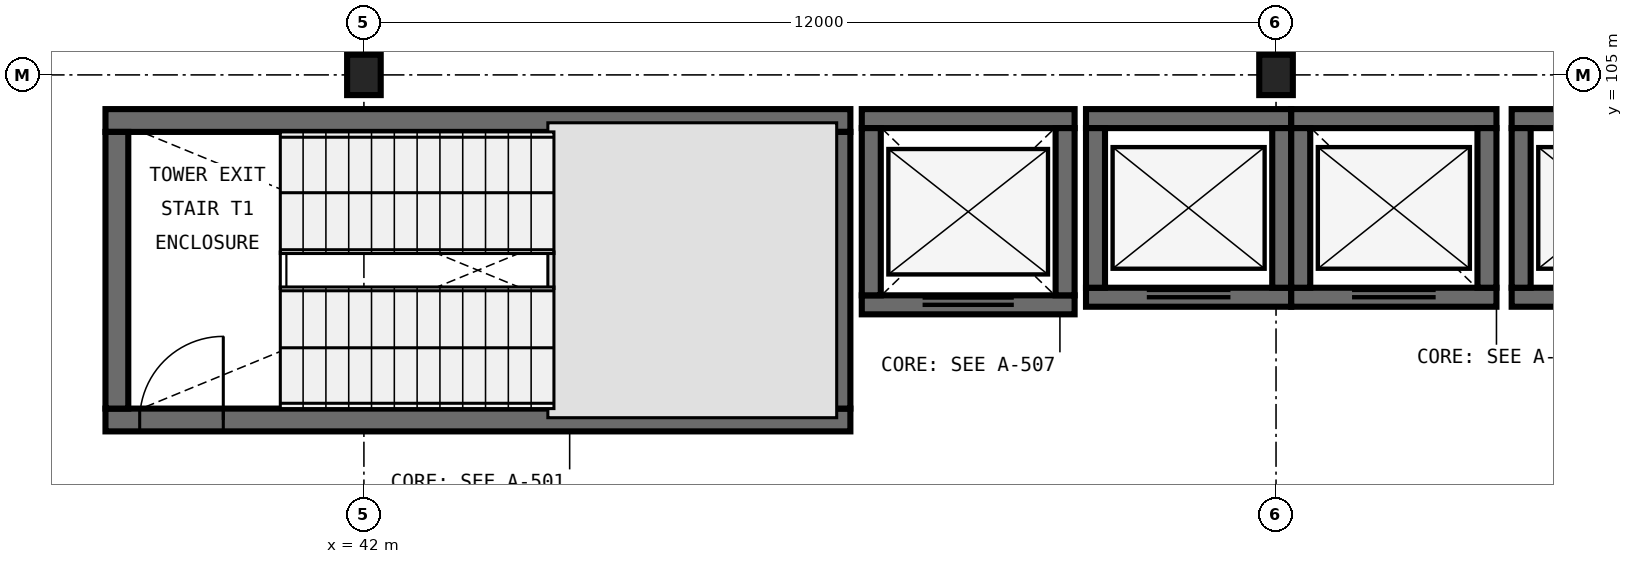
"""IFC4 building model, lengths in metres.
Left out: names, types, materials, properties, quantities, classifications, styles, units other than length and angle.
Written with IfcOpenShell. Run it as: python <this file> out.ifc"""

import sys

from ifc_helpers import new_model, si_unit, direction, frame, frame_2d, origin, origin_2d, place, context, subcontext, project, spatial, rectangle, i_section, extrude, element, fill, save


model = new_model("IFC4")
c1 = context("Model", 3, precision=1e-05, world=origin(), true_north=direction((0.0, 1.0)))
c2 = subcontext(c1, "Body", "Model", "MODEL_VIEW")
j1 = project(units=[si_unit("LENGTHUNIT", "METRE"), si_unit("PLANEANGLEUNIT", "RADIAN")], contexts=[c1])
p1 = place(None, origin())
s1 = spatial("IfcSite", under=j1, at=p1, CompositionType="ELEMENT")
p2 = place(p1, origin())
s2 = spatial("IfcBuilding", under=s1, at=p2, CompositionType="ELEMENT")
p3 = place(p2, frame((0.0, 0.0, 23.4)))
s3 = spatial("IfcBuildingStorey", under=s2, at=p3, CompositionType="ELEMENT", Elevation=23.4)
for number, where, z_axis, x_axis in (
    (1, (42.0, 105.0, 0.0), (0.0, 0.0, 1.0), (1.0, 0.0, 0.0)),
    (2, (54.0, 105.0, 0.0), (0.0, 0.0, 1.0), (1.0, 0.0, 0.0)),
):
    element("IfcColumn", number, at=place(p3, frame(where, z_axis=z_axis, x_axis=x_axis)), inside=s3, PredefinedType="COLUMN", context=c2, shape_type="SweptSolid", body=[
        extrude(i_section(OverallWidth=0.442, OverallDepth=0.531, WebThickness=0.066, FlangeThickness=0.106, FilletRadius=0.031, at=origin_2d()), origin(), (0.0, 0.0, 1.0), 4.2),
    ])
p4 = place(p3, frame((38.6, 100.46, 0.0), z_axis=(0.0, 0.0, 1.0), x_axis=(1.0, 0.0, 0.0)))
e3 = element("IfcWall", 3, at=p4, inside=s3, PredefinedType="SHEAR", context=c2, shape_type="SweptSolid", body=[
    extrude(rectangle(XDim=9.8, YDim=0.3, at=frame_2d((4.9, 0.0))), origin(), (0.0, 0.0, 1.0), 4.2),
])
p5 = place(p4, frame((0.45, 0.0, 0.0)))
e4 = element("IfcOpeningElement", 4, at=p5, cuts=e3, PredefinedType="OPENING", context=c2, shape_type="SweptSolid", body=[
    extrude(rectangle(XDim=1.1, YDim=2.2, at=frame_2d((0.55, 1.1))), frame((0.0, 0.165, 0.0), z_axis=(0.0, -1.0, 0.0), x_axis=(1.0, 0.0, 0.0)), (0.0, 0.0, 1.0), 0.33),
])
p6 = place(p3, frame((48.4, 104.4, 0.0), z_axis=(0.0, 0.0, 1.0), x_axis=(-1.0, 0.0, 0.0)))
e5 = element("IfcWall", 5, at=p6, inside=s3, PredefinedType="SHEAR", context=c2, shape_type="SweptSolid", body=[
    extrude(rectangle(XDim=9.8, YDim=0.3, at=frame_2d((4.9, 0.0))), origin(), (0.0, 0.0, 1.0), 4.2),
])
for number, where, z_axis, x_axis in (
    (6, (38.75, 104.25, 0.0), (0.0, 0.0, 1.0), (0.0, -1.0, 0.0)),
    (7, (48.25, 100.61, 0.0), (0.0, 0.0, 1.0), (0.0, 1.0, 0.0)),
):
    element("IfcWall", number, at=place(p3, frame(where, z_axis=z_axis, x_axis=x_axis)), inside=s3, PredefinedType="SHEAR", context=c2, shape_type="SweptSolid", body=[
        extrude(rectangle(XDim=3.64, YDim=0.3, at=frame_2d((1.82, 0.0))), origin(), (0.0, 0.0, 1.0), 4.2),
    ])
p7 = place(p3, frame((48.55, 101.975, 0.0), z_axis=(0.0, 0.0, 1.0), x_axis=(1.0, 0.0, 0.0)))
e8 = element("IfcWall", 8, at=p7, inside=s3, PredefinedType="SHEAR", context=c2, shape_type="SweptSolid", body=[
    extrude(rectangle(XDim=2.8, YDim=0.25, at=frame_2d((1.4, 0.0))), origin(), (0.0, 0.0, 1.0), 4.2),
])
p8 = place(p7, frame((0.8, 0.0, 0.0)))
e9 = element("IfcOpeningElement", 9, at=p8, cuts=e8, PredefinedType="OPENING", context=c2, shape_type="SweptSolid", body=[
    extrude(rectangle(XDim=1.2, YDim=2.2, at=frame_2d((0.6, 1.1))), frame((0.0, 0.14, 0.0), z_axis=(0.0, -1.0, 0.0), x_axis=(1.0, 0.0, 0.0)), (0.0, 0.0, 1.0), 0.28),
])
p9 = place(p3, frame((51.35, 104.425, 0.0), z_axis=(0.0, 0.0, 1.0), x_axis=(-1.0, 0.0, 0.0)))
e10 = element("IfcWall", 10, at=p9, inside=s3, PredefinedType="SHEAR", context=c2, shape_type="SweptSolid", body=[
    extrude(rectangle(XDim=2.8, YDim=0.25, at=frame_2d((1.4, 0.0))), origin(), (0.0, 0.0, 1.0), 4.2),
])
for number, where, z_axis, x_axis in (
    (11, (48.675, 104.3, 0.0), (0.0, 0.0, 1.0), (0.0, -1.0, 0.0)),
    (12, (51.225, 102.1, 0.0), (0.0, 0.0, 1.0), (0.0, 1.0, 0.0)),
):
    element("IfcWall", number, at=place(p3, frame(where, z_axis=z_axis, x_axis=x_axis)), inside=s3, PredefinedType="SHEAR", context=c2, shape_type="SweptSolid", body=[
        extrude(rectangle(XDim=2.2, YDim=0.25, at=frame_2d((1.1, 0.0))), origin(), (0.0, 0.0, 1.0), 4.2),
    ])
p10 = place(p3, frame((51.5, 102.075, 0.0), z_axis=(0.0, 0.0, 1.0), x_axis=(1.0, 0.0, 0.0)))
e13 = element("IfcWall", 13, at=p10, inside=s3, PredefinedType="SHEAR", context=c2, shape_type="SweptSolid", body=[
    extrude(rectangle(XDim=2.7, YDim=0.25, at=frame_2d((1.35, 0.0))), origin(), (0.0, 0.0, 1.0), 4.2),
])
p11 = place(p10, frame((0.8, 0.0, 0.0)))
e14 = element("IfcOpeningElement", 14, at=p11, cuts=e13, PredefinedType="OPENING", context=c2, shape_type="SweptSolid", body=[
    extrude(rectangle(XDim=1.1, YDim=2.2, at=frame_2d((0.55, 1.1))), frame((0.0, 0.14, 0.0), z_axis=(0.0, -1.0, 0.0), x_axis=(1.0, 0.0, 0.0)), (0.0, 0.0, 1.0), 0.28),
])
p12 = place(p3, frame((54.2, 104.425, 0.0), z_axis=(0.0, 0.0, 1.0), x_axis=(-1.0, 0.0, 0.0)))
e15 = element("IfcWall", 15, at=p12, inside=s3, PredefinedType="SHEAR", context=c2, shape_type="SweptSolid", body=[
    extrude(rectangle(XDim=2.7, YDim=0.25, at=frame_2d((1.35, 0.0))), origin(), (0.0, 0.0, 1.0), 4.2),
])
for number, where, z_axis, x_axis in (
    (16, (51.625, 104.3, 0.0), (0.0, 0.0, 1.0), (0.0, -1.0, 0.0)),
    (17, (54.075, 102.2, 0.0), (0.0, 0.0, 1.0), (0.0, 1.0, 0.0)),
):
    element("IfcWall", number, at=place(p3, frame(where, z_axis=z_axis, x_axis=x_axis)), inside=s3, PredefinedType="SHEAR", context=c2, shape_type="SweptSolid", body=[
        extrude(rectangle(XDim=2.1, YDim=0.25, at=frame_2d((1.05, 0.0))), origin(), (0.0, 0.0, 1.0), 4.2),
    ])
p13 = place(p3, frame((54.2, 102.075, 0.0), z_axis=(0.0, 0.0, 1.0), x_axis=(1.0, 0.0, 0.0)))
e18 = element("IfcWall", 18, at=p13, inside=s3, PredefinedType="SHEAR", context=c2, shape_type="SweptSolid", body=[
    extrude(rectangle(XDim=2.7, YDim=0.25, at=frame_2d((1.35, 0.0))), origin(), (0.0, 0.0, 1.0), 4.2),
])
p14 = place(p13, frame((0.8, 0.0, 0.0)))
e19 = element("IfcOpeningElement", 19, at=p14, cuts=e18, PredefinedType="OPENING", context=c2, shape_type="SweptSolid", body=[
    extrude(rectangle(XDim=1.1, YDim=2.2, at=frame_2d((0.55, 1.1))), frame((0.0, 0.14, 0.0), z_axis=(0.0, -1.0, 0.0), x_axis=(1.0, 0.0, 0.0)), (0.0, 0.0, 1.0), 0.28),
])
p15 = place(p3, frame((56.9, 104.425, 0.0), z_axis=(0.0, 0.0, 1.0), x_axis=(-1.0, 0.0, 0.0)))
e20 = element("IfcWall", 20, at=p15, inside=s3, PredefinedType="SHEAR", context=c2, shape_type="SweptSolid", body=[
    extrude(rectangle(XDim=2.7, YDim=0.25, at=frame_2d((1.35, 0.0))), origin(), (0.0, 0.0, 1.0), 4.2),
])
for number, where, z_axis, x_axis in (
    (21, (54.325, 104.3, 0.0), (0.0, 0.0, 1.0), (0.0, -1.0, 0.0)),
    (22, (56.775, 102.2, 0.0), (0.0, 0.0, 1.0), (0.0, 1.0, 0.0)),
):
    element("IfcWall", number, at=place(p3, frame(where, z_axis=z_axis, x_axis=x_axis)), inside=s3, PredefinedType="SHEAR", context=c2, shape_type="SweptSolid", body=[
        extrude(rectangle(XDim=2.1, YDim=0.25, at=frame_2d((1.05, 0.0))), origin(), (0.0, 0.0, 1.0), 4.2),
    ])
p16 = place(p3, frame((57.1, 102.075, 0.0), z_axis=(0.0, 0.0, 1.0), x_axis=(1.0, 0.0, 0.0)))
e23 = element("IfcWall", 23, at=p16, inside=s3, PredefinedType="SHEAR", context=c2, shape_type="SweptSolid", body=[
    extrude(rectangle(XDim=2.7, YDim=0.25, at=frame_2d((1.35, 0.0))), origin(), (0.0, 0.0, 1.0), 4.2),
])
p17 = place(p16, frame((0.8, 0.0, 0.0)))
e24 = element("IfcOpeningElement", 24, at=p17, cuts=e23, PredefinedType="OPENING", context=c2, shape_type="SweptSolid", body=[
    extrude(rectangle(XDim=1.1, YDim=2.2, at=frame_2d((0.55, 1.1))), frame((0.0, 0.14, 0.0), z_axis=(0.0, -1.0, 0.0), x_axis=(1.0, 0.0, 0.0)), (0.0, 0.0, 1.0), 0.28),
])
p18 = place(p3, frame((59.8, 104.425, 0.0), z_axis=(0.0, 0.0, 1.0), x_axis=(-1.0, 0.0, 0.0)))
e25 = element("IfcWall", 25, at=p18, inside=s3, PredefinedType="SHEAR", context=c2, shape_type="SweptSolid", body=[
    extrude(rectangle(XDim=2.7, YDim=0.25, at=frame_2d((1.35, 0.0))), origin(), (0.0, 0.0, 1.0), 4.2),
])
p19 = place(p3, frame((57.225, 104.3, 0.0), z_axis=(0.0, 0.0, 1.0), x_axis=(0.0, -1.0, 0.0)))
e26 = element("IfcWall", 26, at=p19, inside=s3, PredefinedType="SHEAR", context=c2, shape_type="SweptSolid", body=[
    extrude(rectangle(XDim=2.1, YDim=0.25, at=frame_2d((1.05, 0.0))), origin(), (0.0, 0.0, 1.0), 4.2),
])
p20 = place(p5, origin())
e27 = element("IfcDoor", 27, at=p20, inside=s3, OperationType="SINGLE_SWING_RIGHT", PredefinedType="DOOR", context=c2, shape_type="SweptSolid", body=[
    extrude(rectangle(XDim=1.1, YDim=2.2, at=frame_2d((0.55, 1.1))), frame((0.0, 0.025, 0.0), z_axis=(0.0, -1.0, 0.0), x_axis=(1.0, 0.0, 0.0)), (0.0, 0.0, 1.0), 0.05),
])
fill(e4, e27)
p21 = place(p8, origin())
e28 = element("IfcDoor", 28, at=p21, inside=s3, OperationType="DOUBLE_DOOR_SLIDING", PredefinedType="DOOR", context=c2, shape_type="SweptSolid", body=[
    extrude(rectangle(XDim=1.2, YDim=2.2, at=frame_2d((0.6, 1.1))), frame((0.0, 0.025, 0.0), z_axis=(0.0, -1.0, 0.0), x_axis=(1.0, 0.0, 0.0)), (0.0, 0.0, 1.0), 0.05),
])
fill(e9, e28)
p22 = place(p11, origin())
e29 = element("IfcDoor", 29, at=p22, inside=s3, OperationType="DOUBLE_DOOR_SLIDING", PredefinedType="DOOR", context=c2, shape_type="SweptSolid", body=[
    extrude(rectangle(XDim=1.1, YDim=2.2, at=frame_2d((0.55, 1.1))), frame((0.0, 0.025, 0.0), z_axis=(0.0, -1.0, 0.0), x_axis=(1.0, 0.0, 0.0)), (0.0, 0.0, 1.0), 0.05),
])
fill(e14, e29)
p23 = place(p14, origin())
e30 = element("IfcDoor", 30, at=p23, inside=s3, OperationType="DOUBLE_DOOR_SLIDING", PredefinedType="DOOR", context=c2, shape_type="SweptSolid", body=[
    extrude(rectangle(XDim=1.1, YDim=2.2, at=frame_2d((0.55, 1.1))), frame((0.0, 0.025, 0.0), z_axis=(0.0, -1.0, 0.0), x_axis=(1.0, 0.0, 0.0)), (0.0, 0.0, 1.0), 0.05),
])
fill(e19, e30)
save(model, sys.argv[1])
